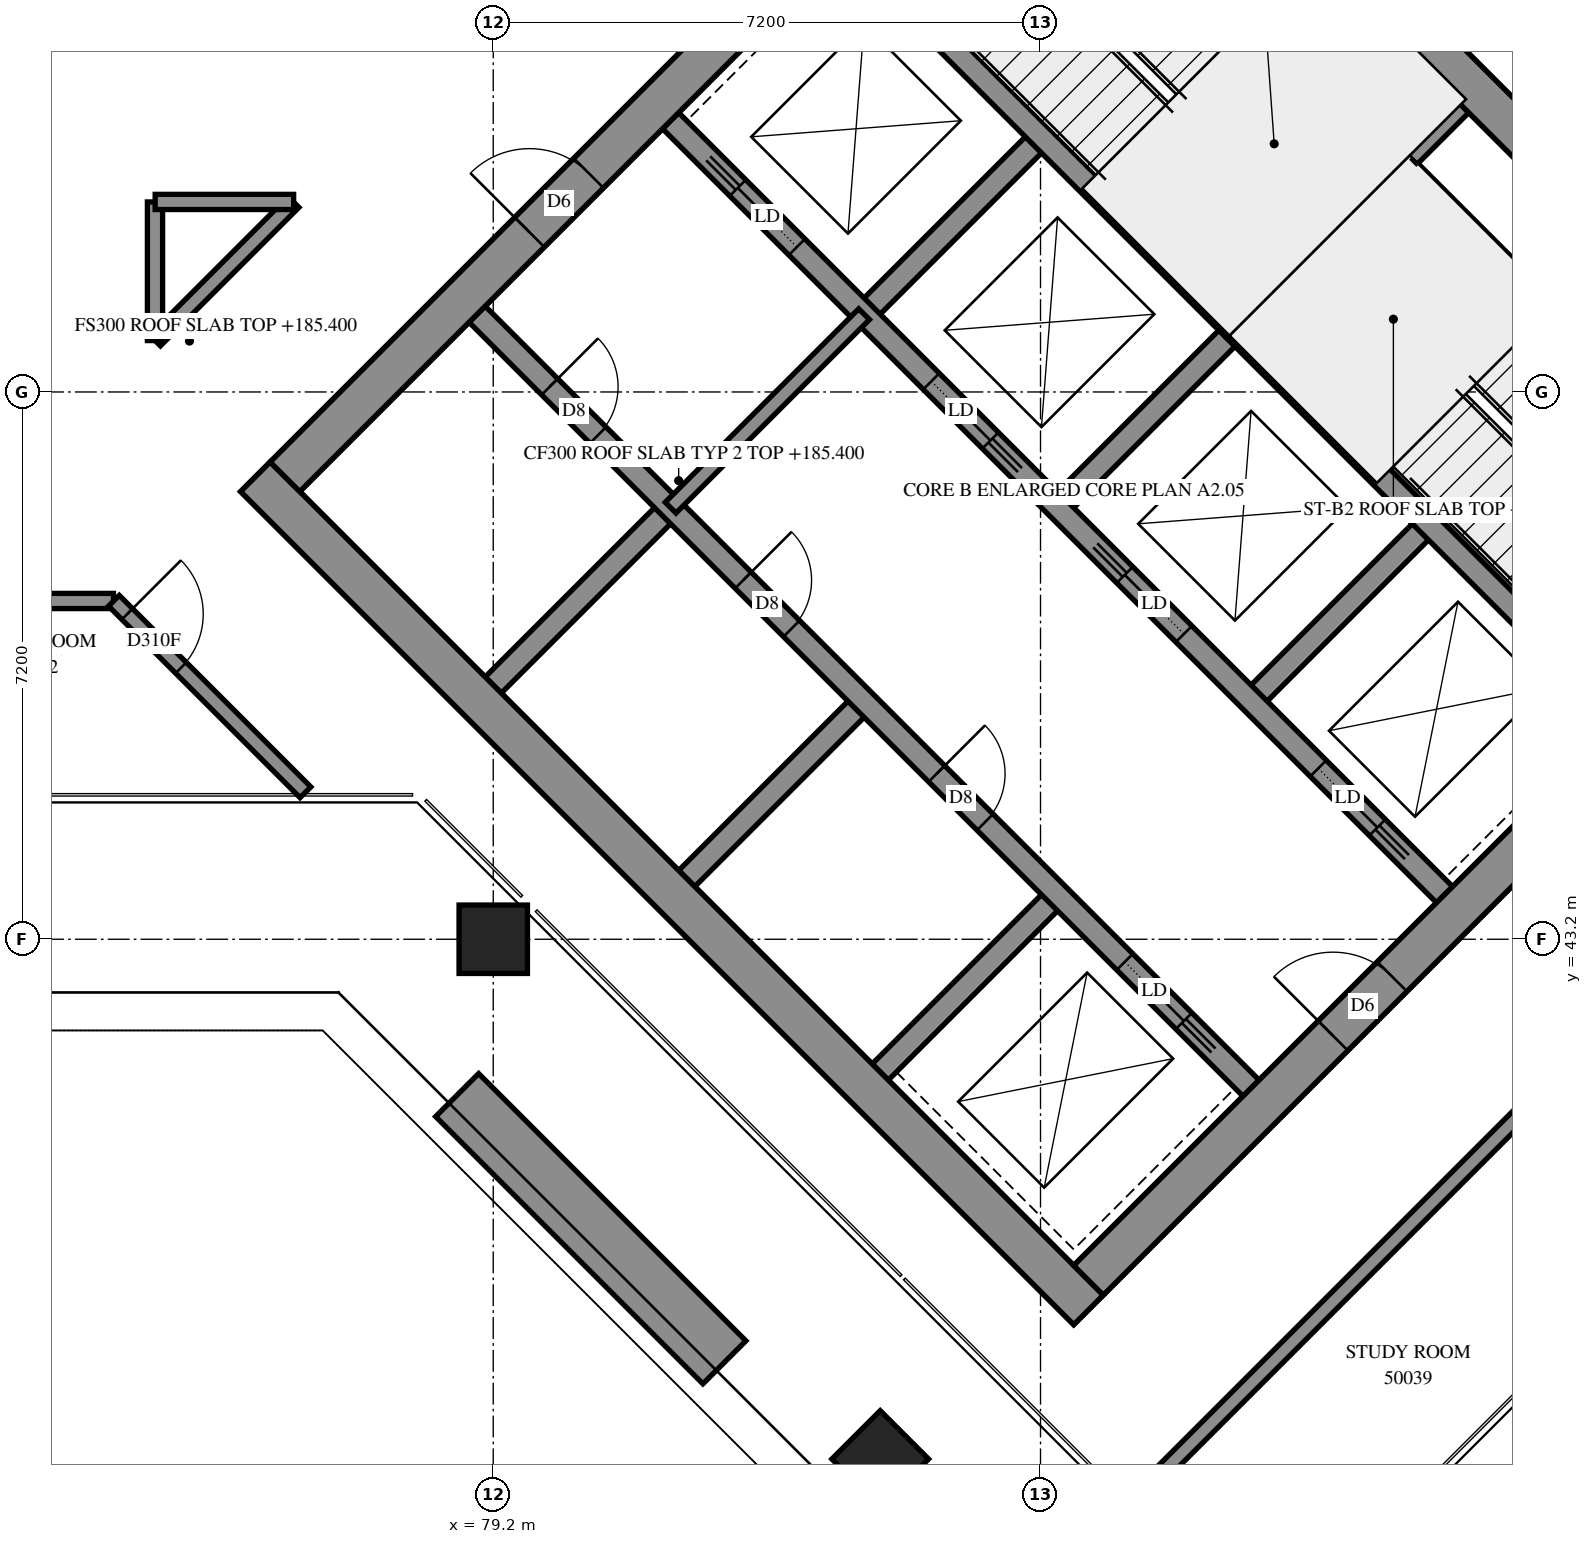
"""IFC4 building model, lengths in metres.
Left out: names, types, materials, properties, quantities, classifications, styles, units other than length and angle.
Written with IfcOpenShell. Run it as: python <this file> out.ifc"""

import sys

from ifc_helpers import new_model, si_unit, direction, frame, frame_2d, origin, origin_2d, place, context, subcontext, project, spatial, rectangle, extrude, element, fill, save


model = new_model("IFC4")
c1 = context("Model", 3, precision=1e-05, world=origin(), true_north=direction((0.0, 1.0)))
c2 = subcontext(c1, "Body", "Model", "MODEL_VIEW")
j1 = project(units=[si_unit("LENGTHUNIT", "METRE"), si_unit("PLANEANGLEUNIT", "RADIAN")], contexts=[c1])
p1 = place(None, origin())
s1 = spatial("IfcSite", under=j1, at=p1, CompositionType="ELEMENT")
p2 = place(p1, origin())
s2 = spatial("IfcBuilding", under=s1, at=p2, CompositionType="ELEMENT")
p3 = place(p2, frame((0.0, 0.0, 185.4)))
s3 = spatial("IfcBuildingStorey", under=s2, at=p3, CompositionType="ELEMENT", Elevation=185.4)
for number, where, z_axis, x_axis in (
    (1, (79.2, 43.2, 0.0), (0.0, 0.0, 1.0), (1.0, 0.0, 0.0)),
    (2, (84.291, 36.362, 0.0), (0.0, 0.0, 1.0), (0.707, -0.707, 0.0)),
):
    element("IfcColumn", number, at=place(p3, frame(where, z_axis=z_axis, x_axis=x_axis)), inside=s3, PredefinedType="COLUMN", context=c2, shape_type="SweptSolid", body=[
        extrude(rectangle(XDim=0.9, YDim=0.9, at=origin_2d()), origin(), (0.0, 0.0, 1.0), 3.9),
    ])
p4 = place(p3, frame((76.071, 49.284, -0.3), z_axis=(0.0, 0.0, 1.0), x_axis=(0.7071035554, -0.707110007, 0.0)))
e3 = element("IfcWall", 3, at=p4, inside=s3, PredefinedType="SHEAR", context=c2, shape_type="SweptSolid", body=[
    extrude(rectangle(XDim=15.5, YDim=0.55, at=frame_2d((7.75, 0.0))), origin(), (0.0, 0.0, 1.0), 3.5),
])
p5 = place(p3, frame((86.642, 59.855, -0.3), z_axis=(0.0, 0.0, 1.0), x_axis=(0.707110007, -0.7071035554, 0.0)))
e4 = element("IfcWall", 4, at=p5, inside=s3, PredefinedType="SHEAR", context=c2, shape_type="SweptSolid", body=[
    extrude(rectangle(XDim=15.5, YDim=0.55, at=frame_2d((7.75, 0.0))), origin(), (0.0, 0.0, 1.0), 3.5),
])
p6 = place(p5, frame((10.55, 0.0, 0.3)))
e5 = element("IfcOpeningElement", 5, at=p6, cuts=e4, PredefinedType="OPENING", context=c2, shape_type="SweptSolid", body=[
    extrude(rectangle(XDim=0.8, YDim=2.1, at=frame_2d((0.4, 1.05))), frame((0.0, 0.285, 0.0), z_axis=(0.0, -1.0, 0.0), x_axis=(1.0, 0.0, 0.0)), (0.0, 0.0, 1.0), 0.57),
])
p7 = place(p3, frame((76.46, 49.284, -0.3), z_axis=(0.0, 0.0, 1.0), x_axis=(0.7071067812, 0.7071067812, 0.0)))
e6 = element("IfcWall", 6, at=p7, inside=s3, PredefinedType="SHEAR", context=c2, shape_type="SweptSolid", body=[
    extrude(rectangle(XDim=14.4, YDim=0.55, at=frame_2d((7.2, 0.0))), origin(), (0.0, 0.0, 1.0), 3.5),
])
p8 = place(p7, frame((4.55, 0.0, 0.3)))
e7 = element("IfcOpeningElement", 7, at=p8, cuts=e6, PredefinedType="OPENING", context=c2, shape_type="SweptSolid", body=[
    extrude(rectangle(XDim=1.1, YDim=2.1, at=frame_2d((0.55, 1.05))), frame((0.0, 0.285, 0.0), z_axis=(0.0, -1.0, 0.0), x_axis=(1.0, 0.0, 0.0)), (0.0, 0.0, 1.0), 0.57),
])
p9 = place(p7, frame((11.35, 0.0, 0.3)))
e8 = element("IfcOpeningElement", 8, at=p9, cuts=e6, PredefinedType="OPENING", context=c2, shape_type="SweptSolid", body=[
    extrude(rectangle(XDim=1.1, YDim=2.1, at=frame_2d((0.55, 1.05))), frame((0.0, 0.285, 0.0), z_axis=(0.0, -1.0, 0.0), x_axis=(1.0, 0.0, 0.0)), (0.0, 0.0, 1.0), 0.57),
])
p10 = place(p3, frame((87.031, 38.713, -0.3), z_axis=(0.0, 0.0, 1.0), x_axis=(0.707103309, 0.7071102534, 0.0)))
e9 = element("IfcWall", 9, at=p10, inside=s3, PredefinedType="SHEAR", context=c2, shape_type="SweptSolid", body=[
    extrude(rectangle(XDim=14.4, YDim=0.55, at=frame_2d((7.2, 0.0))), origin(), (0.0, 0.0, 1.0), 3.5),
])
p11 = place(p10, frame((4.55, 0.0, 0.3)))
e10 = element("IfcOpeningElement", 10, at=p11, cuts=e9, PredefinedType="OPENING", context=c2, shape_type="SweptSolid", body=[
    extrude(rectangle(XDim=1.1, YDim=2.1, at=frame_2d((0.55, 1.05))), frame((0.0, 0.285, 0.0), z_axis=(0.0, -1.0, 0.0), x_axis=(1.0, 0.0, 0.0)), (0.0, 0.0, 1.0), 0.57),
])
p12 = place(p10, frame((11.35, 0.0, 0.3)))
e11 = element("IfcOpeningElement", 11, at=p12, cuts=e9, PredefinedType="OPENING", context=c2, shape_type="SweptSolid", body=[
    extrude(rectangle(XDim=1.1, YDim=2.1, at=frame_2d((0.55, 1.05))), frame((0.0, 0.285, 0.0), z_axis=(0.0, -1.0, 0.0), x_axis=(1.0, 0.0, 0.0)), (0.0, 0.0, 1.0), 0.57),
])
for number, where, z_axis, x_axis in (
    (12, (79.2, 46.544, 0.0), (0.0, 0.0, 1.0), (0.707, 0.707, 0.0)),
    (13, (84.079, 51.423, 0.0), (0.0, 0.0, 1.0), (0.707, 0.707, 0.0)),
):
    element("IfcWall", number, at=place(p3, frame(where, z_axis=z_axis, x_axis=x_axis)), inside=s3, PredefinedType="SOLIDWALL", context=c2, shape_type="SweptSolid", body=[
        extrude(rectangle(XDim=3.3, YDim=0.3, at=frame_2d((1.65, 0.0))), origin(), (0.0, 0.0, 1.0), 3.9),
    ])
p13 = place(p3, frame((81.746, 43.999, 0.0), z_axis=(0.0, 0.0, 1.0), x_axis=(0.7071067812, 0.7071067812, 0.0)))
e14 = element("IfcWall", 14, at=p13, inside=s3, PredefinedType="SOLIDWALL", context=c2, shape_type="SweptSolid", body=[
    extrude(rectangle(XDim=3.3, YDim=0.3, at=frame_2d((1.65, 0.0))), origin(), (0.0, 0.0, 1.0), 3.9),
])
p14 = place(p3, frame((86.625, 48.878, 0.0), z_axis=(0.0, 0.0, 1.0), x_axis=(0.7071067812, 0.7071067812, 0.0)))
e15 = element("IfcWall", 15, at=p14, inside=s3, PredefinedType="SOLIDWALL", context=c2, shape_type="SweptSolid", body=[
    extrude(rectangle(XDim=3.3, YDim=0.3, at=frame_2d((1.65, 0.0))), origin(), (0.0, 0.0, 1.0), 3.9),
])
p15 = place(p3, frame((84.291, 41.453, 0.0), z_axis=(0.0, 0.0, 1.0), x_axis=(0.7071067812, 0.7071067812, 0.0)))
e16 = element("IfcWall", 16, at=p15, inside=s3, PredefinedType="SOLIDWALL", context=c2, shape_type="SweptSolid", body=[
    extrude(rectangle(XDim=3.3, YDim=0.3, at=frame_2d((1.65, 0.0))), origin(), (0.0, 0.0, 1.0), 3.9),
])
p16 = place(p3, frame((89.17, 46.332, 0.0), z_axis=(0.0, 0.0, 1.0), x_axis=(0.7071067812, 0.7071067812, 0.0)))
e17 = element("IfcWall", 17, at=p16, inside=s3, PredefinedType="SOLIDWALL", context=c2, shape_type="SweptSolid", body=[
    extrude(rectangle(XDim=3.3, YDim=0.3, at=frame_2d((1.65, 0.0))), origin(), (0.0, 0.0, 1.0), 3.9),
])
p17 = place(p3, frame((78.988, 51.423, 0.0), z_axis=(0.0, 0.0, 1.0), x_axis=(0.7071067812, -0.7071067812, 0.0)))
e18 = element("IfcWall", 18, at=p17, inside=s3, PredefinedType="SOLIDWALL", context=c2, shape_type="SweptSolid", body=[
    extrude(rectangle(XDim=14.4, YDim=0.3, at=frame_2d((7.2, 0.0))), origin(), (0.0, 0.0, 1.0), 3.9),
])
p18 = place(p17, frame((1.35, 0.0, 0.0)))
e19 = element("IfcOpeningElement", 19, at=p18, cuts=e18, PredefinedType="OPENING", context=c2, shape_type="SweptSolid", body=[
    extrude(rectangle(XDim=0.9, YDim=2.1, at=frame_2d((0.45, 1.05))), frame((0.0, 0.16, 0.0), z_axis=(0.0, -1.0, 0.0), x_axis=(1.0, 0.0, 0.0)), (0.0, 0.0, 1.0), 0.32),
])
p19 = place(p17, frame((4.95, 0.0, 0.0)))
e20 = element("IfcOpeningElement", 20, at=p19, cuts=e18, PredefinedType="OPENING", context=c2, shape_type="SweptSolid", body=[
    extrude(rectangle(XDim=0.9, YDim=2.1, at=frame_2d((0.45, 1.05))), frame((0.0, 0.16, 0.0), z_axis=(0.0, -1.0, 0.0), x_axis=(1.0, 0.0, 0.0)), (0.0, 0.0, 1.0), 0.32),
])
p20 = place(p17, frame((8.55, 0.0, 0.0)))
e21 = element("IfcOpeningElement", 21, at=p20, cuts=e18, PredefinedType="OPENING", context=c2, shape_type="SweptSolid", body=[
    extrude(rectangle(XDim=0.9, YDim=2.1, at=frame_2d((0.45, 1.05))), frame((0.0, 0.16, 0.0), z_axis=(0.0, -1.0, 0.0), x_axis=(1.0, 0.0, 0.0)), (0.0, 0.0, 1.0), 0.32),
])
p21 = place(p17, frame((12.05, 0.0, 0.0)))
e22 = element("IfcOpeningElement", 22, at=p21, cuts=e18, PredefinedType="OPENING", context=c2, shape_type="SweptSolid", body=[
    extrude(rectangle(XDim=1.1, YDim=2.1, at=frame_2d((0.55, 1.05))), frame((0.0, 0.16, 0.0), z_axis=(0.0, -1.0, 0.0), x_axis=(1.0, 0.0, 0.0)), (0.0, 0.0, 1.0), 0.32),
])
p22 = place(p3, frame((81.534, 53.969, 0.0), z_axis=(0.0, 0.0, 1.0), x_axis=(0.707103309, -0.7071102534, 0.0)))
e23 = element("IfcWall", 23, at=p22, inside=s3, PredefinedType="SOLIDWALL", context=c2, shape_type="SweptSolid", body=[
    extrude(rectangle(XDim=14.4, YDim=0.3, at=frame_2d((7.2, 0.0))), origin(), (0.0, 0.0, 1.0), 3.9),
])
p23 = place(p22, frame((1.25, 0.0, 0.0)))
e24 = element("IfcOpeningElement", 24, at=p23, cuts=e23, PredefinedType="OPENING", context=c2, shape_type="SweptSolid", body=[
    extrude(rectangle(XDim=1.1, YDim=2.1, at=frame_2d((0.55, 1.05))), frame((0.0, 0.16, 0.0), z_axis=(0.0, -1.0, 0.0), x_axis=(1.0, 0.0, 0.0)), (0.0, 0.0, 1.0), 0.32),
])
p24 = place(p22, frame((4.85, 0.0, 0.0)))
e25 = element("IfcOpeningElement", 25, at=p24, cuts=e23, PredefinedType="OPENING", context=c2, shape_type="SweptSolid", body=[
    extrude(rectangle(XDim=1.1, YDim=2.1, at=frame_2d((0.55, 1.05))), frame((0.0, 0.16, 0.0), z_axis=(0.0, -1.0, 0.0), x_axis=(1.0, 0.0, 0.0)), (0.0, 0.0, 1.0), 0.32),
])
p25 = place(p22, frame((8.45, 0.0, 0.0)))
e26 = element("IfcOpeningElement", 26, at=p25, cuts=e23, PredefinedType="OPENING", context=c2, shape_type="SweptSolid", body=[
    extrude(rectangle(XDim=1.1, YDim=2.1, at=frame_2d((0.55, 1.05))), frame((0.0, 0.16, 0.0), z_axis=(0.0, -1.0, 0.0), x_axis=(1.0, 0.0, 0.0)), (0.0, 0.0, 1.0), 0.32),
])
p26 = place(p22, frame((12.05, 0.0, 0.0)))
e27 = element("IfcOpeningElement", 27, at=p26, cuts=e23, PredefinedType="OPENING", context=c2, shape_type="SweptSolid", body=[
    extrude(rectangle(XDim=1.1, YDim=2.1, at=frame_2d((0.55, 1.05))), frame((0.0, 0.16, 0.0), z_axis=(0.0, -1.0, 0.0), x_axis=(1.0, 0.0, 0.0)), (0.0, 0.0, 1.0), 0.32),
])
for number, where, z_axis, x_axis in (
    (28, (83.867, 56.302, 0.0), (0.0, 0.0, 1.0), (0.707, -0.707, 0.0)),
    (29, (88.958, 51.211, 0.0), (0.0, 0.0, 1.0), (0.707, -0.707, 0.0)),
):
    element("IfcWall", number, at=place(p3, frame(where, z_axis=z_axis, x_axis=x_axis)), inside=s3, PredefinedType="SOLIDWALL", context=c2, shape_type="SweptSolid", body=[
        extrude(rectangle(XDim=7.2, YDim=0.3, at=frame_2d((3.6, 0.0))), origin(), (0.0, 0.0, 1.0), 3.9),
    ])
p27 = place(p3, frame((88.958, 51.211, 0.0), z_axis=(0.0, 0.0, 1.0), x_axis=(0.7071067812, 0.7071067812, 0.0)))
e30 = element("IfcWall", 30, at=p27, inside=s3, PredefinedType="SOLIDWALL", context=c2, shape_type="SweptSolid", body=[
    extrude(rectangle(XDim=4.2, YDim=0.3, at=frame_2d((2.1, 0.0))), origin(), (0.0, 0.0, 1.0), 3.9),
])
p28 = place(p3, frame((78.725, 41.15, 0.0), z_axis=(0.0, 0.0, 1.0), x_axis=(0.7071067812, -0.7071067812, 0.0)))
e31 = element("IfcWall", 31, at=p28, inside=s3, PredefinedType="SOLIDWALL", context=c2, shape_type="SweptSolid", body=[
    extrude(rectangle(XDim=4.973, YDim=0.8, at=frame_2d((2.486, 0.0))), origin(), (0.0, 0.0, 1.0), 0.65),
])
p29 = place(p3, frame((91.313, 53.354, 0.0), z_axis=(0.0, 0.0, 1.0), x_axis=(0.7071140275, -0.7070995348, 0.0)))
e32 = element("IfcWall", 32, at=p29, inside=s3, PredefinedType="PARTITIONING", context=c2, shape_type="SweptSolid", body=[
    extrude(rectangle(XDim=6.9, YDim=0.15, at=frame_2d((3.45, 0.0))), origin(), (0.0, 0.0, 1.0), 3.9),
])
p30 = place(p3, frame((81.534, 48.878, 0.0), z_axis=(0.0, 0.0, 1.0), x_axis=(0.707092892, 0.7071206701, 0.0)))
e33 = element("IfcWall", 33, at=p30, inside=s3, PredefinedType="PARTITIONING", context=c2, shape_type="SweptSolid", body=[
    extrude(rectangle(XDim=3.6, YDim=0.2, at=frame_2d((1.8, 0.0))), origin(), (0.0, 0.0, 1.0), 3.9),
])
p31 = place(p3, frame((54.85, 47.65, 0.0), z_axis=(0.0, 0.0, 1.0), x_axis=(1.0, 0.0, 0.0)))
e34 = element("IfcWall", 34, at=p31, inside=s3, PredefinedType="PARTITIONING", context=c2, shape_type="SweptSolid", body=[
    extrude(rectangle(XDim=19.354, YDim=0.2, at=frame_2d((9.677, 0.0))), origin(), (0.0, 0.0, 1.0), 3.9),
])
p32 = place(p31, frame((4.782, 0.0, 0.0)))
e35 = element("IfcOpeningElement", 35, at=p32, cuts=e34, PredefinedType="OPENING", context=c2, shape_type="SweptSolid", body=[
    extrude(rectangle(XDim=1.0, YDim=2.1, at=frame_2d((0.5, 1.05))), frame((0.0, 0.11, 0.0), z_axis=(0.0, -1.0, 0.0), x_axis=(1.0, 0.0, 0.0)), (0.0, 0.0, 1.0), 0.22),
])
p33 = place(p31, frame((6.857, 0.0, 0.0)))
e36 = element("IfcOpeningElement", 36, at=p33, cuts=e34, PredefinedType="OPENING", context=c2, shape_type="SweptSolid", body=[
    extrude(rectangle(XDim=1.0, YDim=2.1, at=frame_2d((0.5, 1.05))), frame((0.0, 0.11, 0.0), z_axis=(0.0, -1.0, 0.0), x_axis=(1.0, 0.0, 0.0)), (0.0, 0.0, 1.0), 0.22),
])
p34 = place(p31, frame((11.982, 0.0, 0.0)))
e37 = element("IfcOpeningElement", 37, at=p34, cuts=e34, PredefinedType="OPENING", context=c2, shape_type="SweptSolid", body=[
    extrude(rectangle(XDim=1.0, YDim=2.1, at=frame_2d((0.5, 1.05))), frame((0.0, 0.11, 0.0), z_axis=(0.0, -1.0, 0.0), x_axis=(1.0, 0.0, 0.0)), (0.0, 0.0, 1.0), 0.22),
])
p35 = place(p31, frame((14.057, 0.0, 0.0)))
e38 = element("IfcOpeningElement", 38, at=p35, cuts=e34, PredefinedType="OPENING", context=c2, shape_type="SweptSolid", body=[
    extrude(rectangle(XDim=1.0, YDim=2.1, at=frame_2d((0.5, 1.05))), frame((0.0, 0.11, 0.0), z_axis=(0.0, -1.0, 0.0), x_axis=(1.0, 0.0, 0.0)), (0.0, 0.0, 1.0), 0.22),
])
p36 = place(p3, frame((87.599, 35.783, 0.0), z_axis=(0.0, 0.0, 1.0), x_axis=(0.7071067812, 0.7071067812, 0.0)))
e39 = element("IfcWall", 39, at=p36, inside=s3, PredefinedType="PARTITIONING", context=c2, shape_type="SweptSolid", body=[
    extrude(rectangle(XDim=7.77, YDim=0.2, at=frame_2d((3.885, 0.0))), origin(), (0.0, 0.0, 1.0), 3.9),
])
p37 = place(p3, frame((74.209, 47.653, 0.0), z_axis=(0.0, 0.0, 1.0), x_axis=(0.7071067812, -0.7071067812, 0.0)))
e40 = element("IfcWall", 40, at=p37, inside=s3, PredefinedType="PARTITIONING", context=c2, shape_type="SweptSolid", body=[
    extrude(rectangle(XDim=3.564, YDim=0.2, at=frame_2d((1.782, 0.0))), origin(), (0.0, 0.0, 1.0), 3.9),
])
p38 = place(p37, frame((0.248, 0.0, 0.0)))
e41 = element("IfcOpeningElement", 41, at=p38, cuts=e40, PredefinedType="OPENING", context=c2, shape_type="SweptSolid", body=[
    extrude(rectangle(XDim=1.0, YDim=2.1, at=frame_2d((0.5, 1.05))), frame((0.0, 0.11, 0.0), z_axis=(0.0, -1.0, 0.0), x_axis=(1.0, 0.0, 0.0)), (0.0, 0.0, 1.0), 0.22),
])
p39 = place(p3, frame((74.751, 51.077, 0.0), z_axis=(0.0, 0.0, 1.0), x_axis=(0.7071067812, 0.7071067812, 0.0)))
e42 = element("IfcWall", 42, at=p39, inside=s3, PredefinedType="PARTITIONING", context=c2, shape_type="SweptSolid", body=[
    extrude(rectangle(XDim=2.577, YDim=0.2, at=frame_2d((1.288, 0.0))), origin(), (0.0, 0.0, 1.0), 3.9),
])
p40 = place(p3, frame((74.75, 51.076, 0.0), z_axis=(0.0, 0.0, 1.0), x_axis=(0.0, 1.0, 0.0)))
e43 = element("IfcWall", 43, at=p40, inside=s3, PredefinedType="PARTITIONING", context=c2, shape_type="SweptSolid", body=[
    extrude(rectangle(XDim=1.824, YDim=0.2, at=frame_2d((0.912, 0.0))), origin(), (0.0, 0.0, 1.0), 3.9),
])
p41 = place(p3, frame((74.752, 52.9, 0.0), z_axis=(0.0, 0.0, 1.0), x_axis=(1.0, 0.0, 0.0)))
e44 = element("IfcWall", 44, at=p41, inside=s3, PredefinedType="PARTITIONING", context=c2, shape_type="SweptSolid", body=[
    extrude(rectangle(XDim=1.822, YDim=0.2, at=frame_2d((0.911, 0.0))), origin(), (0.0, 0.0, 1.0), 3.9),
])
p42 = place(p8, origin())
e45 = element("IfcDoor", 45, at=p42, inside=s3, OperationType="DOUBLE_DOOR_SINGLE_SWING", PredefinedType="DOOR", context=c2, shape_type="SweptSolid", body=[
    extrude(rectangle(XDim=1.1, YDim=2.1, at=frame_2d((0.55, 1.05))), frame((0.0, 0.025, 0.0), z_axis=(0.0, -1.0, 0.0), x_axis=(1.0, 0.0, 0.0)), (0.0, 0.0, 1.0), 0.05),
])
fill(e7, e45)
p43 = place(p11, origin())
e46 = element("IfcDoor", 46, at=p43, inside=s3, OperationType="DOUBLE_DOOR_SINGLE_SWING", PredefinedType="DOOR", context=c2, shape_type="SweptSolid", body=[
    extrude(rectangle(XDim=1.1, YDim=2.1, at=frame_2d((0.55, 1.05))), frame((0.0, 0.025, 0.0), z_axis=(0.0, -1.0, 0.0), x_axis=(1.0, 0.0, 0.0)), (0.0, 0.0, 1.0), 0.05),
])
fill(e10, e46)
p44 = place(p18, origin())
e47 = element("IfcDoor", 47, at=p44, inside=s3, OperationType="SINGLE_SWING_LEFT", PredefinedType="DOOR", context=c2, shape_type="SweptSolid", body=[
    extrude(rectangle(XDim=0.9, YDim=2.1, at=frame_2d((0.45, 1.05))), frame((0.0, 0.025, 0.0), z_axis=(0.0, -1.0, 0.0), x_axis=(1.0, 0.0, 0.0)), (0.0, 0.0, 1.0), 0.05),
])
fill(e19, e47)
p45 = place(p19, origin())
e48 = element("IfcDoor", 48, at=p45, inside=s3, OperationType="SINGLE_SWING_LEFT", PredefinedType="DOOR", context=c2, shape_type="SweptSolid", body=[
    extrude(rectangle(XDim=0.9, YDim=2.1, at=frame_2d((0.45, 1.05))), frame((0.0, 0.025, 0.0), z_axis=(0.0, -1.0, 0.0), x_axis=(1.0, 0.0, 0.0)), (0.0, 0.0, 1.0), 0.05),
])
fill(e20, e48)
p46 = place(p20, origin())
e49 = element("IfcDoor", 49, at=p46, inside=s3, OperationType="SINGLE_SWING_LEFT", PredefinedType="DOOR", context=c2, shape_type="SweptSolid", body=[
    extrude(rectangle(XDim=0.9, YDim=2.1, at=frame_2d((0.45, 1.05))), frame((0.0, 0.025, 0.0), z_axis=(0.0, -1.0, 0.0), x_axis=(1.0, 0.0, 0.0)), (0.0, 0.0, 1.0), 0.05),
])
fill(e21, e49)
p47 = place(p21, origin())
e50 = element("IfcDoor", 50, at=p47, inside=s3, OperationType="SLIDING_TO_RIGHT", PredefinedType="DOOR", context=c2, shape_type="SweptSolid", body=[
    extrude(rectangle(XDim=1.1, YDim=2.1, at=frame_2d((0.55, 1.05))), frame((0.0, 0.025, 0.0), z_axis=(0.0, -1.0, 0.0), x_axis=(1.0, 0.0, 0.0)), (0.0, 0.0, 1.0), 0.05),
])
fill(e22, e50)
p48 = place(p23, origin())
e51 = element("IfcDoor", 51, at=p48, inside=s3, OperationType="SLIDING_TO_LEFT", PredefinedType="DOOR", context=c2, shape_type="SweptSolid", body=[
    extrude(rectangle(XDim=1.1, YDim=2.1, at=frame_2d((0.55, 1.05))), frame((0.0, 0.025, 0.0), z_axis=(0.0, -1.0, 0.0), x_axis=(1.0, 0.0, 0.0)), (0.0, 0.0, 1.0), 0.05),
])
fill(e24, e51)
p49 = place(p24, origin())
e52 = element("IfcDoor", 52, at=p49, inside=s3, OperationType="SLIDING_TO_RIGHT", PredefinedType="DOOR", context=c2, shape_type="SweptSolid", body=[
    extrude(rectangle(XDim=1.1, YDim=2.1, at=frame_2d((0.55, 1.05))), frame((0.0, 0.025, 0.0), z_axis=(0.0, -1.0, 0.0), x_axis=(1.0, 0.0, 0.0)), (0.0, 0.0, 1.0), 0.05),
])
fill(e25, e52)
p50 = place(p25, origin())
e53 = element("IfcDoor", 53, at=p50, inside=s3, OperationType="SLIDING_TO_LEFT", PredefinedType="DOOR", context=c2, shape_type="SweptSolid", body=[
    extrude(rectangle(XDim=1.1, YDim=2.1, at=frame_2d((0.55, 1.05))), frame((0.0, 0.025, 0.0), z_axis=(0.0, -1.0, 0.0), x_axis=(1.0, 0.0, 0.0)), (0.0, 0.0, 1.0), 0.05),
])
fill(e26, e53)
p51 = place(p26, origin())
e54 = element("IfcDoor", 54, at=p51, inside=s3, OperationType="SLIDING_TO_RIGHT", PredefinedType="DOOR", context=c2, shape_type="SweptSolid", body=[
    extrude(rectangle(XDim=1.1, YDim=2.1, at=frame_2d((0.55, 1.05))), frame((0.0, 0.025, 0.0), z_axis=(0.0, -1.0, 0.0), x_axis=(1.0, 0.0, 0.0)), (0.0, 0.0, 1.0), 0.05),
])
fill(e27, e54)
p52 = place(p38, origin())
e55 = element("IfcDoor", 55, at=p52, inside=s3, OperationType="SINGLE_SWING_LEFT", PredefinedType="DOOR", context=c2, shape_type="SweptSolid", body=[
    extrude(rectangle(XDim=1.0, YDim=2.1, at=frame_2d((0.5, 1.05))), frame((0.0, 0.025, 0.0), z_axis=(0.0, -1.0, 0.0), x_axis=(1.0, 0.0, 0.0)), (0.0, 0.0, 1.0), 0.05),
])
fill(e41, e55)
save(model, sys.argv[1])
